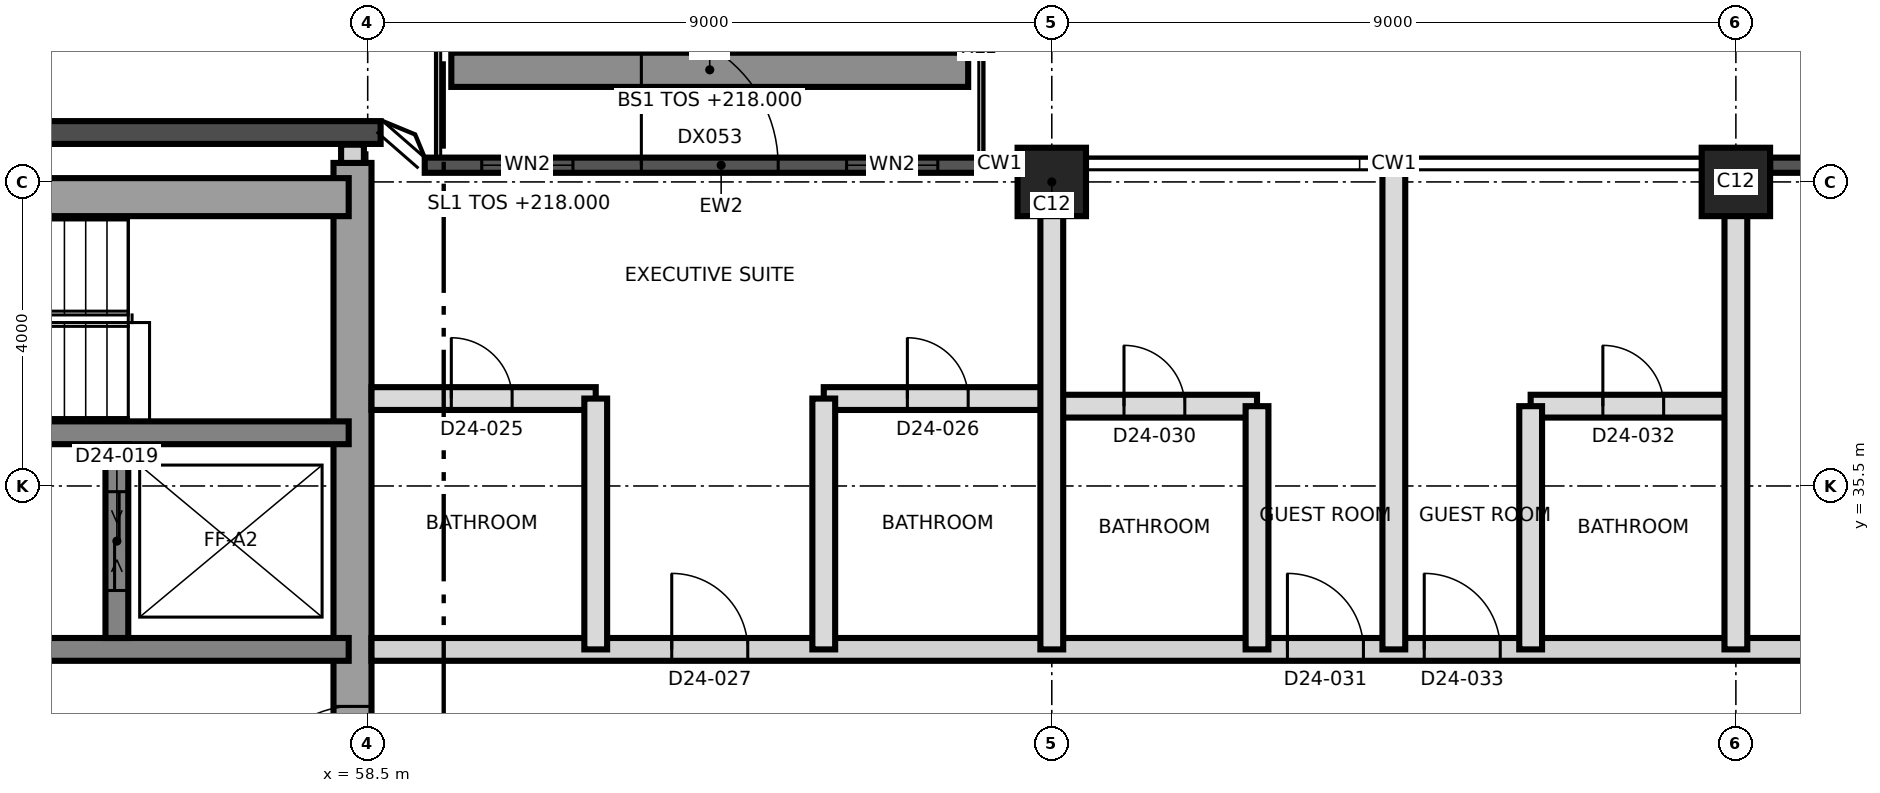
"""IFC4 building model, lengths in metres.
Left out: names, types, materials, properties, quantities, classifications, styles, units other than length and angle.
Written with IfcOpenShell. Run it as: python <this file> out.ifc"""

import sys

from ifc_helpers import new_model, si_unit, direction, frame, frame_2d, origin, origin_2d, place, context, subcontext, project, spatial, rectangle, extrude, element, fill, save


model = new_model("IFC4")
c1 = context("Model", 3, precision=1e-05, world=origin(), true_north=direction((0.0, 1.0)))
c2 = subcontext(c1, "Body", "Model", "MODEL_VIEW")
j1 = project(units=[si_unit("LENGTHUNIT", "METRE"), si_unit("PLANEANGLEUNIT", "RADIAN")], contexts=[c1])
p1 = place(None, origin())
s1 = spatial("IfcSite", under=j1, at=p1, CompositionType="ELEMENT")
p2 = place(p1, origin())
s2 = spatial("IfcBuilding", under=s1, at=p2, CompositionType="ELEMENT")
p3 = place(p2, frame((0.0, 0.0, 218.0)))
s3 = spatial("IfcBuildingStorey", under=s2, at=p3, CompositionType="ELEMENT", Elevation=218.0)
p4 = place(p3, frame((58.3, 21.25, 0.0), z_axis=(0.0, 0.0, 1.0), x_axis=(0.0, 1.0, 0.0)))
e1 = element("IfcWall", 1, at=p4, inside=s3, PredefinedType="SHEAR", context=c2, shape_type="SweptSolid", body=[
    extrude(rectangle(XDim=18.5, YDim=0.5, at=frame_2d((9.25, 0.0))), origin(), (0.0, 0.0, 1.0), 3.7),
])
p5 = place(p4, frame((10.15, 0.0, 0.0)))
e2 = element("IfcOpeningElement", 2, at=p5, cuts=e1, PredefinedType="OPENING", context=c2, shape_type="SweptSolid", body=[
    extrude(rectangle(XDim=1.2, YDim=2.1, at=frame_2d((0.6, 1.05))), frame((0.0, 0.26, 0.0), z_axis=(0.0, -1.0, 0.0), x_axis=(1.0, 0.0, 0.0)), (0.0, 0.0, 1.0), 0.52),
])
p6 = place(p3, frame((31.25, 39.3, 0.0), z_axis=(0.0, 0.0, 1.0), x_axis=(1.0, 0.0, 0.0)))
e3 = element("IfcWall", 3, at=p6, inside=s3, PredefinedType="SHEAR", context=c2, shape_type="SweptSolid", body=[
    extrude(rectangle(XDim=27.0, YDim=0.5, at=frame_2d((13.5, 0.0))), origin(), (0.0, 0.0, 1.0), 3.7),
])
p7 = place(p6, frame((10.45, 0.0, 0.0)))
e4 = element("IfcOpeningElement", 4, at=p7, cuts=e3, PredefinedType="OPENING", context=c2, shape_type="SweptSolid", body=[
    extrude(rectangle(XDim=1.2, YDim=2.1, at=frame_2d((0.6, 1.05))), frame((0.0, 0.26, 0.0), z_axis=(0.0, -1.0, 0.0), x_axis=(1.0, 0.0, 0.0)), (0.0, 0.0, 1.0), 0.52),
])
p8 = place(p3, frame((31.75, 33.35, 0.0), z_axis=(0.0, 0.0, 1.0), x_axis=(1.0, 0.0, 0.0)))
e5 = element("IfcWall", 5, at=p8, inside=s3, PredefinedType="SHEAR", context=c2, shape_type="SweptSolid", body=[
    extrude(rectangle(XDim=26.5, YDim=0.3, at=frame_2d((13.25, 0.0))), origin(), (0.0, 0.0, 1.0), 3.7),
])
p9 = place(p8, frame((13.9, 0.0, 0.0)))
e6 = element("IfcOpeningElement", 6, at=p9, cuts=e5, PredefinedType="OPENING", context=c2, shape_type="SweptSolid", body=[
    extrude(rectangle(XDim=1.4, YDim=2.1, at=frame_2d((0.7, 1.05))), frame((0.0, 0.16, 0.0), z_axis=(0.0, -1.0, 0.0), x_axis=(1.0, 0.0, 0.0)), (0.0, 0.0, 1.0), 0.32),
])
p10 = place(p8, frame((5.375, 0.0, 0.0)))
e7 = element("IfcOpeningElement", 7, at=p10, cuts=e5, PredefinedType="OPENING", context=c2, shape_type="SweptSolid", body=[
    extrude(rectangle(XDim=1.2, YDim=2.1, at=frame_2d((0.6, 1.05))), frame((0.0, 0.16, 0.0), z_axis=(0.0, -1.0, 0.0), x_axis=(1.0, 0.0, 0.0)), (0.0, 0.0, 1.0), 0.32),
])
p11 = place(p8, frame((19.925, 0.0, 0.0)))
e8 = element("IfcOpeningElement", 8, at=p11, cuts=e5, PredefinedType="OPENING", context=c2, shape_type="SweptSolid", body=[
    extrude(rectangle(XDim=1.2, YDim=2.1, at=frame_2d((0.6, 1.05))), frame((0.0, 0.16, 0.0), z_axis=(0.0, -1.0, 0.0), x_axis=(1.0, 0.0, 0.0)), (0.0, 0.0, 1.0), 0.32),
])
p12 = place(p3, frame((43.5, 36.2, 0.0), z_axis=(0.0, 0.0, 1.0), x_axis=(1.0, 0.0, 0.0)))
e9 = element("IfcWall", 9, at=p12, inside=s3, PredefinedType="SHEAR", context=c2, shape_type="SweptSolid", body=[
    extrude(rectangle(XDim=14.75, YDim=0.3, at=frame_2d((7.375, 0.0))), origin(), (0.0, 0.0, 1.0), 3.7),
])
p13 = place(p12, frame((6.9, 0.0, 0.0)))
e10 = element("IfcOpeningElement", 10, at=p13, cuts=e9, PredefinedType="OPENING", context=c2, shape_type="SweptSolid", body=[
    extrude(rectangle(XDim=1.2, YDim=2.1, at=frame_2d((0.6, 1.05))), frame((0.0, 0.16, 0.0), z_axis=(0.0, -1.0, 0.0), x_axis=(1.0, 0.0, 0.0)), (0.0, 0.0, 1.0), 0.32),
])
p14 = place(p12, frame((0.7, 0.0, 0.0)))
e11 = element("IfcOpeningElement", 11, at=p14, cuts=e9, PredefinedType="OPENING", context=c2, shape_type="SweptSolid", body=[
    extrude(rectangle(XDim=1.3, YDim=2.4, at=frame_2d((0.65, 1.2))), frame((0.0, 0.16, 0.0), z_axis=(0.0, -1.0, 0.0), x_axis=(1.0, 0.0, 0.0)), (0.0, 0.0, 1.0), 0.32),
])
p15 = place(p12, frame((3.7, 0.0, 0.0)))
e12 = element("IfcOpeningElement", 12, at=p15, cuts=e9, PredefinedType="OPENING", context=c2, shape_type="SweptSolid", body=[
    extrude(rectangle(XDim=1.3, YDim=2.4, at=frame_2d((0.65, 1.2))), frame((0.0, 0.16, 0.0), z_axis=(0.0, -1.0, 0.0), x_axis=(1.0, 0.0, 0.0)), (0.0, 0.0, 1.0), 0.32),
])
p16 = place(p3, frame((55.2, 33.5, 0.0), z_axis=(0.0, 0.0, 1.0), x_axis=(0.0, 1.0, 0.0)))
e13 = element("IfcWall", 13, at=p16, inside=s3, PredefinedType="SHEAR", context=c2, shape_type="SweptSolid", body=[
    extrude(rectangle(XDim=2.55, YDim=0.3, at=frame_2d((1.275, 0.0))), origin(), (0.0, 0.0, 1.0), 3.7),
])
p17 = place(p16, frame((0.625, 0.0, 0.0)))
e14 = element("IfcOpeningElement", 14, at=p17, cuts=e13, PredefinedType="OPENING", context=c2, shape_type="SweptSolid", body=[
    extrude(rectangle(XDim=1.3, YDim=2.4, at=frame_2d((0.65, 1.2))), frame((0.0, 0.16, 0.0), z_axis=(0.0, -1.0, 0.0), x_axis=(1.0, 0.0, 0.0)), (0.0, 0.0, 1.0), 0.32),
])
for number, where, z_axis, x_axis in (
    (15, (67.5, 39.5, 0.0), (0.0, 0.0, 1.0), (1.0, 0.0, 0.0)),
    (16, (76.5, 39.5, 0.0), (0.0, 0.0, 1.0), (1.0, 0.0, 0.0)),
):
    element("IfcColumn", number, at=place(p3, frame(where, z_axis=z_axis, x_axis=x_axis)), inside=s3, PredefinedType="COLUMN", context=c2, shape_type="SweptSolid", body=[
        extrude(rectangle(XDim=0.9, YDim=0.9, at=origin_2d()), origin(), (0.0, 0.0, 1.0), 3.7),
    ])
p18 = place(p3, frame((63.0, 40.975, 0.0), z_axis=(0.0, 0.0, 1.0), x_axis=(1.0, 0.0, 0.0)))
e17 = element("IfcWall", 17, at=p18, inside=s3, PredefinedType="SOLIDWALL", context=c2, shape_type="SweptSolid", body=[
    extrude(rectangle(XDim=6.8, YDim=0.45, at=origin_2d()), origin(), (0.0, 0.0, 1.0), 1.0),
])
p19 = place(p3, frame((58.67, 40.15, 0.0), z_axis=(0.0, 0.0, 1.0), x_axis=(-1.0, 0.0, 0.0)))
e18 = element("IfcWall", 18, at=p19, inside=s3, PredefinedType="SOLIDWALL", context=c2, shape_type="SweptSolid", body=[
    extrude(rectangle(XDim=5.341, YDim=0.3, at=frame_2d((2.67, 0.0))), origin(), (0.0, 0.0, 1.0), 3.4),
])
p20 = place(p3, frame((76.95, 39.72, 0.0), z_axis=(0.0, 0.0, 1.0), x_axis=(1.0, 0.0, 0.0)))
e19 = element("IfcWall", 19, at=p20, inside=s3, PredefinedType="SOLIDWALL", context=c2, shape_type="SweptSolid", body=[
    extrude(rectangle(XDim=8.1, YDim=0.2, at=frame_2d((4.05, 0.0))), origin(), (0.0, 0.0, 1.0), 3.4),
])
p21 = place(p20, frame((3.15, 0.0, 0.0)))
e20 = element("IfcOpeningElement", 20, at=p21, cuts=e19, PredefinedType="OPENING", context=c2, shape_type="SweptSolid", body=[
    extrude(rectangle(XDim=1.8, YDim=2.4, at=frame_2d((0.9, 1.2))), frame((0.0, 0.11, 0.0), z_axis=(0.0, -1.0, 0.0), x_axis=(1.0, 0.0, 0.0)), (0.0, 0.0, 1.0), 0.22),
])
p22 = place(p20, frame((5.85, 0.0, 0.9)))
e21 = element("IfcOpeningElement", 21, at=p22, cuts=e19, PredefinedType="OPENING", context=c2, shape_type="SweptSolid", body=[
    extrude(rectangle(XDim=1.2, YDim=2.1, at=frame_2d((0.6, 1.05))), frame((0.0, 0.11, 0.0), z_axis=(0.0, -1.0, 0.0), x_axis=(1.0, 0.0, 0.0)), (0.0, 0.0, 1.0), 0.22),
])
p23 = place(p20, frame((1.05, 0.0, 0.9)))
e22 = element("IfcOpeningElement", 22, at=p23, cuts=e19, PredefinedType="OPENING", context=c2, shape_type="SweptSolid", body=[
    extrude(rectangle(XDim=1.2, YDim=2.1, at=frame_2d((0.6, 1.05))), frame((0.0, 0.11, 0.0), z_axis=(0.0, -1.0, 0.0), x_axis=(1.0, 0.0, 0.0)), (0.0, 0.0, 1.0), 0.22),
])
p24 = place(p3, frame((59.25, 39.72, 0.0), z_axis=(0.0, 0.0, 1.0), x_axis=(1.0, 0.0, 0.0)))
e23 = element("IfcWall", 23, at=p24, inside=s3, PredefinedType="SOLIDWALL", context=c2, shape_type="SweptSolid", body=[
    extrude(rectangle(XDim=7.8, YDim=0.2, at=frame_2d((3.9, 0.0))), origin(), (0.0, 0.0, 1.0), 3.4),
])
p25 = place(p24, frame((2.85, 0.0, 0.0)))
e24 = element("IfcOpeningElement", 24, at=p25, cuts=e23, PredefinedType="OPENING", context=c2, shape_type="SweptSolid", body=[
    extrude(rectangle(XDim=1.8, YDim=2.4, at=frame_2d((0.9, 1.2))), frame((0.0, 0.11, 0.0), z_axis=(0.0, -1.0, 0.0), x_axis=(1.0, 0.0, 0.0)), (0.0, 0.0, 1.0), 0.22),
])
p26 = place(p24, frame((5.55, 0.0, 0.9)))
e25 = element("IfcOpeningElement", 25, at=p26, cuts=e23, PredefinedType="OPENING", context=c2, shape_type="SweptSolid", body=[
    extrude(rectangle(XDim=1.2, YDim=2.1, at=frame_2d((0.6, 1.05))), frame((0.0, 0.11, 0.0), z_axis=(0.0, -1.0, 0.0), x_axis=(1.0, 0.0, 0.0)), (0.0, 0.0, 1.0), 0.22),
])
p27 = place(p24, frame((0.75, 0.0, 0.9)))
e26 = element("IfcOpeningElement", 26, at=p27, cuts=e23, PredefinedType="OPENING", context=c2, shape_type="SweptSolid", body=[
    extrude(rectangle(XDim=1.2, YDim=2.1, at=frame_2d((0.6, 1.05))), frame((0.0, 0.11, 0.0), z_axis=(0.0, -1.0, 0.0), x_axis=(1.0, 0.0, 0.0)), (0.0, 0.0, 1.0), 0.22),
])
p28 = place(p3, frame((58.55, 33.35, 0.0), z_axis=(0.0, 0.0, 1.0), x_axis=(1.0, 0.0, 0.0)))
e27 = element("IfcWall", 27, at=p28, inside=s3, PredefinedType="PARTITIONING", context=c2, shape_type="SweptSolid", body=[
    extrude(rectangle(XDim=26.78, YDim=0.3, at=frame_2d((13.39, 0.0))), origin(), (0.0, 0.0, 1.0), 3.4),
])
p29 = place(p28, frame((3.95, 0.0, 0.0)))
e28 = element("IfcOpeningElement", 28, at=p29, cuts=e27, PredefinedType="OPENING", context=c2, shape_type="SweptSolid", body=[
    extrude(rectangle(XDim=1.0, YDim=2.4, at=frame_2d((0.5, 1.2))), frame((0.0, 0.16, 0.0), z_axis=(0.0, -1.0, 0.0), x_axis=(1.0, 0.0, 0.0)), (0.0, 0.0, 1.0), 0.32),
])
p30 = place(p28, frame((12.05, 0.0, 0.0)))
e29 = element("IfcOpeningElement", 29, at=p30, cuts=e27, PredefinedType="OPENING", context=c2, shape_type="SweptSolid", body=[
    extrude(rectangle(XDim=1.0, YDim=2.1, at=frame_2d((0.5, 1.05))), frame((0.0, 0.16, 0.0), z_axis=(0.0, -1.0, 0.0), x_axis=(1.0, 0.0, 0.0)), (0.0, 0.0, 1.0), 0.32),
])
p31 = place(p28, frame((13.85, 0.0, 0.0)))
e30 = element("IfcOpeningElement", 30, at=p31, cuts=e27, PredefinedType="OPENING", context=c2, shape_type="SweptSolid", body=[
    extrude(rectangle(XDim=1.0, YDim=2.1, at=frame_2d((0.5, 1.05))), frame((0.0, 0.16, 0.0), z_axis=(0.0, -1.0, 0.0), x_axis=(1.0, 0.0, 0.0)), (0.0, 0.0, 1.0), 0.32),
])
p32 = place(p28, frame((20.3, 0.0, 0.0)))
e31 = element("IfcOpeningElement", 31, at=p32, cuts=e27, PredefinedType="OPENING", context=c2, shape_type="SweptSolid", body=[
    extrude(rectangle(XDim=1.0, YDim=2.4, at=frame_2d((0.5, 1.2))), frame((0.0, 0.16, 0.0), z_axis=(0.0, -1.0, 0.0), x_axis=(1.0, 0.0, 0.0)), (0.0, 0.0, 1.0), 0.32),
])
p33 = place(p3, frame((67.5, 36.55, 0.0), z_axis=(0.0, 0.0, 1.0), x_axis=(1.0, 0.0, 0.0)))
e32 = element("IfcWall", 32, at=p33, inside=s3, PredefinedType="PARTITIONING", context=c2, shape_type="SweptSolid", body=[
    extrude(rectangle(XDim=2.7, YDim=0.3, at=frame_2d((1.35, 0.0))), origin(), (0.0, 0.0, 1.0), 3.4),
])
p34 = place(p33, frame((0.95, 0.0, 0.0)))
e33 = element("IfcOpeningElement", 33, at=p34, cuts=e32, PredefinedType="OPENING", context=c2, shape_type="SweptSolid", body=[
    extrude(rectangle(XDim=0.8, YDim=2.1, at=frame_2d((0.4, 1.05))), frame((0.0, 0.16, 0.0), z_axis=(0.0, -1.0, 0.0), x_axis=(1.0, 0.0, 0.0)), (0.0, 0.0, 1.0), 0.32),
])
p35 = place(p3, frame((73.8, 36.55, 0.0), z_axis=(0.0, 0.0, 1.0), x_axis=(1.0, 0.0, 0.0)))
e34 = element("IfcWall", 34, at=p35, inside=s3, PredefinedType="PARTITIONING", context=c2, shape_type="SweptSolid", body=[
    extrude(rectangle(XDim=2.7, YDim=0.3, at=frame_2d((1.35, 0.0))), origin(), (0.0, 0.0, 1.0), 3.4),
])
p36 = place(p35, frame((0.95, 0.0, 0.0)))
e35 = element("IfcOpeningElement", 35, at=p36, cuts=e34, PredefinedType="OPENING", context=c2, shape_type="SweptSolid", body=[
    extrude(rectangle(XDim=0.8, YDim=2.1, at=frame_2d((0.4, 1.05))), frame((0.0, 0.16, 0.0), z_axis=(0.0, -1.0, 0.0), x_axis=(1.0, 0.0, 0.0)), (0.0, 0.0, 1.0), 0.32),
])
p37 = place(p3, frame((58.55, 36.65, 0.0), z_axis=(0.0, 0.0, 1.0), x_axis=(1.0, 0.0, 0.0)))
e36 = element("IfcWall", 36, at=p37, inside=s3, PredefinedType="PARTITIONING", context=c2, shape_type="SweptSolid", body=[
    extrude(rectangle(XDim=2.95, YDim=0.3, at=frame_2d((1.475, 0.0))), origin(), (0.0, 0.0, 1.0), 3.4),
])
p38 = place(p37, frame((1.05, 0.0, 0.0)))
e37 = element("IfcOpeningElement", 37, at=p38, cuts=e36, PredefinedType="OPENING", context=c2, shape_type="SweptSolid", body=[
    extrude(rectangle(XDim=0.8, YDim=2.1, at=frame_2d((0.4, 1.05))), frame((0.0, 0.16, 0.0), z_axis=(0.0, -1.0, 0.0), x_axis=(1.0, 0.0, 0.0)), (0.0, 0.0, 1.0), 0.32),
])
p39 = place(p3, frame((64.5, 36.65, 0.0), z_axis=(0.0, 0.0, 1.0), x_axis=(1.0, 0.0, 0.0)))
e38 = element("IfcWall", 38, at=p39, inside=s3, PredefinedType="PARTITIONING", context=c2, shape_type="SweptSolid", body=[
    extrude(rectangle(XDim=3.0, YDim=0.3, at=frame_2d((1.5, 0.0))), origin(), (0.0, 0.0, 1.0), 3.4),
])
p40 = place(p39, frame((1.1, 0.0, 0.0)))
e39 = element("IfcOpeningElement", 39, at=p40, cuts=e38, PredefinedType="OPENING", context=c2, shape_type="SweptSolid", body=[
    extrude(rectangle(XDim=0.8, YDim=2.1, at=frame_2d((0.4, 1.05))), frame((0.0, 0.16, 0.0), z_axis=(0.0, -1.0, 0.0), x_axis=(1.0, 0.0, 0.0)), (0.0, 0.0, 1.0), 0.32),
])
for number, where, z_axis, x_axis in (
    (40, (61.5, 33.35, 0.0), (0.0, 0.0, 1.0), (0.0, 1.0, 0.0)),
    (41, (64.5, 33.35, 0.0), (0.0, 0.0, 1.0), (0.0, 1.0, 0.0)),
):
    element("IfcWall", number, at=place(p3, frame(where, z_axis=z_axis, x_axis=x_axis)), inside=s3, PredefinedType="PARTITIONING", context=c2, shape_type="SweptSolid", body=[
        extrude(rectangle(XDim=3.3, YDim=0.3, at=frame_2d((1.65, 0.0))), origin(), (0.0, 0.0, 1.0), 3.4),
    ])
p41 = place(p3, frame((67.5, 33.35, 0.0), z_axis=(0.0, 0.0, 1.0), x_axis=(0.0, 1.0, 0.0)))
e42 = element("IfcWall", 42, at=p41, inside=s3, PredefinedType="PARTITIONING", context=c2, shape_type="SweptSolid", body=[
    extrude(rectangle(XDim=6.12, YDim=0.3, at=frame_2d((3.06, 0.0))), origin(), (0.0, 0.0, 1.0), 3.4),
])
p42 = place(p3, frame((70.2, 33.35, 0.0), z_axis=(0.0, 0.0, 1.0), x_axis=(0.0, 1.0, 0.0)))
e43 = element("IfcWall", 43, at=p42, inside=s3, PredefinedType="PARTITIONING", context=c2, shape_type="SweptSolid", body=[
    extrude(rectangle(XDim=3.2, YDim=0.3, at=frame_2d((1.6, 0.0))), origin(), (0.0, 0.0, 1.0), 3.4),
])
p43 = place(p3, frame((72.0, 33.35, 0.0), z_axis=(0.0, 0.0, 1.0), x_axis=(0.0, 1.0, 0.0)))
e44 = element("IfcWall", 44, at=p43, inside=s3, PredefinedType="PARTITIONING", context=c2, shape_type="SweptSolid", body=[
    extrude(rectangle(XDim=6.3, YDim=0.3, at=frame_2d((3.15, 0.0))), origin(), (0.0, 0.0, 1.0), 3.4),
])
p44 = place(p3, frame((73.8, 33.35, 0.0), z_axis=(0.0, 0.0, 1.0), x_axis=(0.0, 1.0, 0.0)))
e45 = element("IfcWall", 45, at=p44, inside=s3, PredefinedType="PARTITIONING", context=c2, shape_type="SweptSolid", body=[
    extrude(rectangle(XDim=3.2, YDim=0.3, at=frame_2d((1.6, 0.0))), origin(), (0.0, 0.0, 1.0), 3.4),
])
p45 = place(p3, frame((76.5, 33.35, 0.0), z_axis=(0.0, 0.0, 1.0), x_axis=(0.0, 1.0, 0.0)))
e46 = element("IfcWall", 46, at=p45, inside=s3, PredefinedType="PARTITIONING", context=c2, shape_type="SweptSolid", body=[
    extrude(rectangle(XDim=6.12, YDim=0.3, at=frame_2d((3.06, 0.0))), origin(), (0.0, 0.0, 1.0), 3.4),
])
p46 = place(p3, frame((58.3, 39.75, 0.0), z_axis=(0.0, 0.0, 1.0), x_axis=(0.0, 1.0, 0.0)))
e47 = element("IfcWall", 47, at=p46, inside=s3, PredefinedType="PARTITIONING", context=c2, shape_type="SweptSolid", body=[
    extrude(rectangle(XDim=0.24, YDim=0.3, at=frame_2d((0.12, 0.0))), origin(), (0.0, 0.0, 1.0), 3.4),
])
p47 = place(p25, origin())
e48 = element("IfcDoor", 48, at=p47, inside=s3, OperationType="SINGLE_SWING_LEFT", PredefinedType="DOOR", context=c2, shape_type="SweptSolid", body=[
    extrude(rectangle(XDim=1.8, YDim=2.4, at=frame_2d((0.9, 1.2))), frame((0.0, 0.025, 0.0), z_axis=(0.0, -1.0, 0.0), x_axis=(1.0, 0.0, 0.0)), (0.0, 0.0, 1.0), 0.05),
])
fill(e24, e48)
p48 = place(p26, origin())
e49 = element("IfcWindow", 49, at=p48, inside=s3, PartitioningType="SINGLE_PANEL", PredefinedType="WINDOW", context=c2, shape_type="SweptSolid", body=[
    extrude(rectangle(XDim=1.2, YDim=2.1, at=frame_2d((0.6, 1.05))), frame((0.0, 0.03, 0.0), z_axis=(0.0, -1.0, 0.0), x_axis=(1.0, 0.0, 0.0)), (0.0, 0.0, 1.0), 0.06),
])
fill(e25, e49)
p49 = place(p27, origin())
e50 = element("IfcWindow", 50, at=p49, inside=s3, PartitioningType="SINGLE_PANEL", PredefinedType="WINDOW", context=c2, shape_type="SweptSolid", body=[
    extrude(rectangle(XDim=1.2, YDim=2.1, at=frame_2d((0.6, 1.05))), frame((0.0, 0.03, 0.0), z_axis=(0.0, -1.0, 0.0), x_axis=(1.0, 0.0, 0.0)), (0.0, 0.0, 1.0), 0.06),
])
fill(e26, e50)
p50 = place(p5, origin())
e51 = element("IfcDoor", 51, at=p50, inside=s3, OperationType="SINGLE_SWING_LEFT", PredefinedType="DOOR", context=c2, shape_type="SweptSolid", body=[
    extrude(rectangle(XDim=1.2, YDim=2.1, at=frame_2d((0.6, 1.05))), frame((0.0, 0.025, 0.0), z_axis=(0.0, -1.0, 0.0), x_axis=(1.0, 0.0, 0.0)), (0.0, 0.0, 1.0), 0.05),
])
fill(e2, e51)
p51 = place(p17, origin())
e52 = element("IfcDoor", 52, at=p51, inside=s3, OperationType="SLIDING_TO_LEFT", PredefinedType="DOOR", context=c2, shape_type="SweptSolid", body=[
    extrude(rectangle(XDim=1.3, YDim=2.4, at=frame_2d((0.65, 1.2))), frame((0.0, 0.025, 0.0), z_axis=(0.0, -1.0, 0.0), x_axis=(1.0, 0.0, 0.0)), (0.0, 0.0, 1.0), 0.05),
])
fill(e14, e52)
p52 = place(p38, origin())
e53 = element("IfcDoor", 53, at=p52, inside=s3, OperationType="SINGLE_SWING_LEFT", PredefinedType="DOOR", context=c2, shape_type="SweptSolid", body=[
    extrude(rectangle(XDim=0.8, YDim=2.1, at=frame_2d((0.4, 1.05))), frame((0.0, 0.025, 0.0), z_axis=(0.0, -1.0, 0.0), x_axis=(1.0, 0.0, 0.0)), (0.0, 0.0, 1.0), 0.05),
])
fill(e37, e53)
p53 = place(p40, origin())
e54 = element("IfcDoor", 54, at=p53, inside=s3, OperationType="SINGLE_SWING_RIGHT", PredefinedType="DOOR", context=c2, shape_type="SweptSolid", body=[
    extrude(rectangle(XDim=0.8, YDim=2.1, at=frame_2d((0.4, 1.05))), frame((0.0, 0.025, 0.0), z_axis=(0.0, -1.0, 0.0), x_axis=(1.0, 0.0, 0.0)), (0.0, 0.0, 1.0), 0.05),
])
fill(e39, e54)
p54 = place(p29, origin())
e55 = element("IfcDoor", 55, at=p54, inside=s3, OperationType="SINGLE_SWING_LEFT", PredefinedType="DOOR", context=c2, shape_type="SweptSolid", body=[
    extrude(rectangle(XDim=1.0, YDim=2.4, at=frame_2d((0.5, 1.2))), frame((0.0, 0.025, 0.0), z_axis=(0.0, -1.0, 0.0), x_axis=(1.0, 0.0, 0.0)), (0.0, 0.0, 1.0), 0.05),
])
fill(e28, e55)
p55 = place(p34, origin())
e56 = element("IfcDoor", 56, at=p55, inside=s3, OperationType="SINGLE_SWING_LEFT", PredefinedType="DOOR", context=c2, shape_type="SweptSolid", body=[
    extrude(rectangle(XDim=0.8, YDim=2.1, at=frame_2d((0.4, 1.05))), frame((0.0, 0.025, 0.0), z_axis=(0.0, -1.0, 0.0), x_axis=(1.0, 0.0, 0.0)), (0.0, 0.0, 1.0), 0.05),
])
fill(e33, e56)
p56 = place(p30, origin())
e57 = element("IfcDoor", 57, at=p56, inside=s3, OperationType="SINGLE_SWING_RIGHT", PredefinedType="DOOR", context=c2, shape_type="SweptSolid", body=[
    extrude(rectangle(XDim=1.0, YDim=2.1, at=frame_2d((0.5, 1.05))), frame((0.0, 0.025, 0.0), z_axis=(0.0, -1.0, 0.0), x_axis=(1.0, 0.0, 0.0)), (0.0, 0.0, 1.0), 0.05),
])
fill(e29, e57)
p57 = place(p36, origin())
e58 = element("IfcDoor", 58, at=p57, inside=s3, OperationType="SINGLE_SWING_RIGHT", PredefinedType="DOOR", context=c2, shape_type="SweptSolid", body=[
    extrude(rectangle(XDim=0.8, YDim=2.1, at=frame_2d((0.4, 1.05))), frame((0.0, 0.025, 0.0), z_axis=(0.0, -1.0, 0.0), x_axis=(1.0, 0.0, 0.0)), (0.0, 0.0, 1.0), 0.05),
])
fill(e35, e58)
p58 = place(p31, origin())
e59 = element("IfcDoor", 59, at=p58, inside=s3, OperationType="SINGLE_SWING_LEFT", PredefinedType="DOOR", context=c2, shape_type="SweptSolid", body=[
    extrude(rectangle(XDim=1.0, YDim=2.1, at=frame_2d((0.5, 1.05))), frame((0.0, 0.025, 0.0), z_axis=(0.0, -1.0, 0.0), x_axis=(1.0, 0.0, 0.0)), (0.0, 0.0, 1.0), 0.05),
])
fill(e30, e59)
save(model, sys.argv[1])
